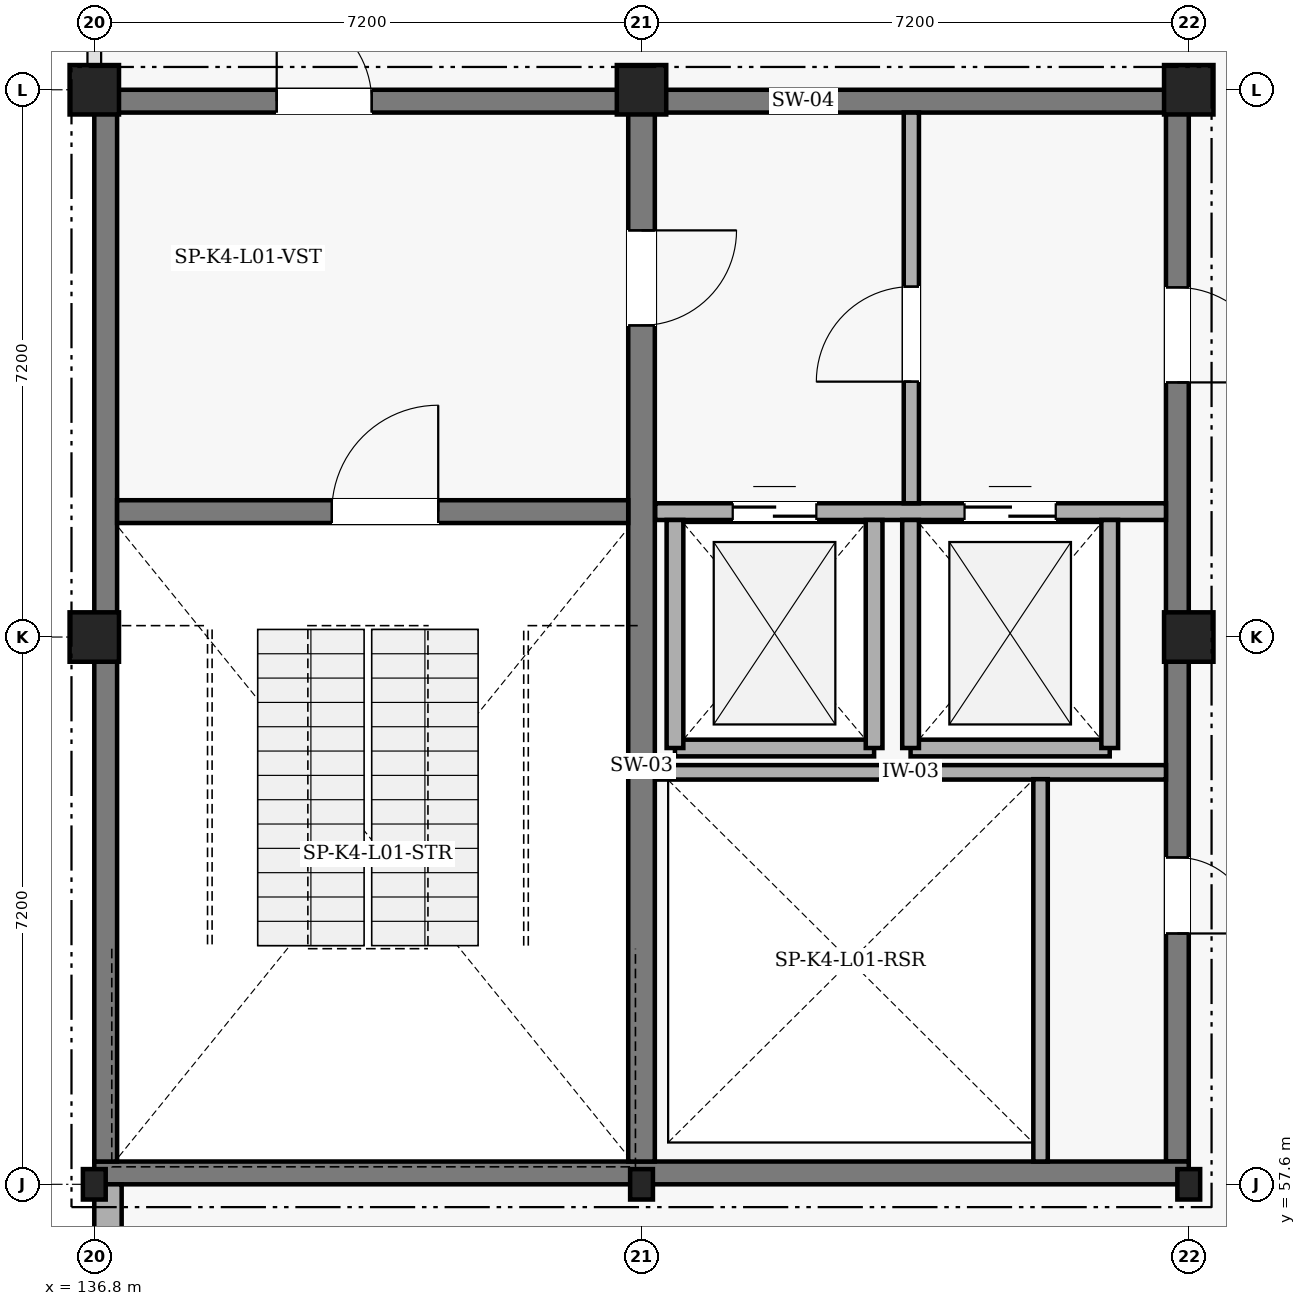
"""IFC4 building model, lengths in metres.
Left out: names, types, materials, properties, quantities, classifications, styles, units other than length and angle.
Written with IfcOpenShell. Run it as: python <this file> out.ifc"""

import sys

from ifc_helpers import new_model, si_unit, direction, frame, frame_2d, origin, origin_2d, place, context, subcontext, project, spatial, rectangle, i_section, extrude, element, fill, save


model = new_model("IFC4")
c1 = context("Model", 3, precision=1e-05, world=origin(), true_north=direction((0.0, 1.0)))
c2 = subcontext(c1, "Body", "Model", "MODEL_VIEW")
j1 = project(units=[si_unit("LENGTHUNIT", "METRE"), si_unit("PLANEANGLEUNIT", "RADIAN")], contexts=[c1])
p1 = place(None, origin())
s1 = spatial("IfcSite", under=j1, at=p1, CompositionType="ELEMENT")
p2 = place(p1, origin())
s2 = spatial("IfcBuilding", under=s1, at=p2, CompositionType="ELEMENT")
p3 = place(p2, frame((0.0, 0.0, 5.4)))
s3 = spatial("IfcBuildingStorey", under=s2, at=p3, CompositionType="ELEMENT", Elevation=5.4)
p4 = place(p3, frame((136.8, 71.85, 0.0), z_axis=(0.0, 0.0, 1.0), x_axis=(1.0, 0.0, 0.0)))
e1 = element("IfcWall", 1, at=p4, inside=s3, PredefinedType="SHEAR", context=c2, shape_type="SweptSolid", body=[
    extrude(rectangle(XDim=14.4, YDim=0.3, at=frame_2d((7.2, 0.0))), origin(), (0.0, 0.0, 1.0), 4.2),
])
p5 = place(p4, frame((2.4, 0.0, 0.0)))
e2 = element("IfcOpeningElement", 2, at=p5, cuts=e1, PredefinedType="OPENING", context=c2, shape_type="SweptSolid", body=[
    extrude(rectangle(XDim=1.25, YDim=2.2, at=frame_2d((0.625, 1.1))), frame((0.0, 0.16, 0.0), z_axis=(0.0, -1.0, 0.0), x_axis=(1.0, 0.0, 0.0)), (0.0, 0.0, 1.0), 0.32),
])
p6 = place(p3, frame((151.05, 71.7, 0.0), z_axis=(0.0, 0.0, 1.0), x_axis=(0.0, -1.0, 0.0)))
e3 = element("IfcWall", 3, at=p6, inside=s3, PredefinedType="SHEAR", context=c2, shape_type="SweptSolid", body=[
    extrude(rectangle(XDim=13.8, YDim=0.3, at=frame_2d((6.9, 0.0))), origin(), (0.0, 0.0, 1.0), 4.2),
])
p7 = place(p6, frame((9.8, 0.0, 0.0)))
e4 = element("IfcOpeningElement", 4, at=p7, cuts=e3, PredefinedType="OPENING", context=c2, shape_type="SweptSolid", body=[
    extrude(rectangle(XDim=1.0, YDim=2.15, at=frame_2d((0.5, 1.075))), frame((0.0, 0.16, 0.0), z_axis=(0.0, -1.0, 0.0), x_axis=(1.0, 0.0, 0.0)), (0.0, 0.0, 1.0), 0.32),
])
p8 = place(p6, frame((2.3, 0.0, 0.0)))
e5 = element("IfcOpeningElement", 5, at=p8, cuts=e3, PredefinedType="OPENING", context=c2, shape_type="SweptSolid", body=[
    extrude(rectangle(XDim=1.25, YDim=2.2, at=frame_2d((0.625, 1.1))), frame((0.0, 0.16, 0.0), z_axis=(0.0, -1.0, 0.0), x_axis=(1.0, 0.0, 0.0)), (0.0, 0.0, 1.0), 0.32),
])
p9 = place(p3, frame((151.2, 57.75, 0.0), z_axis=(0.0, 0.0, 1.0), x_axis=(-1.0, 0.0, 0.0)))
e6 = element("IfcWall", 6, at=p9, inside=s3, PredefinedType="SHEAR", context=c2, shape_type="SweptSolid", body=[
    extrude(rectangle(XDim=14.4, YDim=0.3, at=frame_2d((7.2, 0.0))), origin(), (0.0, 0.0, 1.0), 4.2),
])
p10 = place(p3, frame((136.95, 57.9, 0.0), z_axis=(0.0, 0.0, 1.0), x_axis=(0.0, 1.0, 0.0)))
e7 = element("IfcWall", 7, at=p10, inside=s3, PredefinedType="SHEAR", context=c2, shape_type="SweptSolid", body=[
    extrude(rectangle(XDim=13.8, YDim=0.3, at=frame_2d((6.9, 0.0))), origin(), (0.0, 0.0, 1.0), 4.2),
])
p11 = place(p3, frame((144.0, 71.7, 0.0), z_axis=(0.0, 0.0, 1.0), x_axis=(0.0, -1.0, 0.0)))
e8 = element("IfcWall", 8, at=p11, inside=s3, PredefinedType="SHEAR", context=c2, shape_type="SweptSolid", body=[
    extrude(rectangle(XDim=13.8, YDim=0.35, at=frame_2d((6.9, 0.0))), origin(), (0.0, 0.0, 1.0), 4.2),
])
p12 = place(p11, frame((1.55, 0.0, 0.0)))
e9 = element("IfcOpeningElement", 9, at=p12, cuts=e8, PredefinedType="OPENING", context=c2, shape_type="SweptSolid", body=[
    extrude(rectangle(XDim=1.25, YDim=2.2, at=frame_2d((0.625, 1.1))), frame((0.0, 0.185, 0.0), z_axis=(0.0, -1.0, 0.0), x_axis=(1.0, 0.0, 0.0)), (0.0, 0.0, 1.0), 0.37),
])
p13 = place(p3, frame((137.1, 66.45, 0.0), z_axis=(0.0, 0.0, 1.0), x_axis=(1.0, 0.0, 0.0)))
e10 = element("IfcWall", 10, at=p13, inside=s3, PredefinedType="SHEAR", context=c2, shape_type="SweptSolid", body=[
    extrude(rectangle(XDim=6.725, YDim=0.3, at=frame_2d((3.362, 0.0))), origin(), (0.0, 0.0, 1.0), 4.2),
])
p14 = place(p13, frame((2.825, 0.0, 0.0)))
e11 = element("IfcOpeningElement", 11, at=p14, cuts=e10, PredefinedType="OPENING", context=c2, shape_type="SweptSolid", body=[
    extrude(rectangle(XDim=1.4, YDim=2.2, at=frame_2d((0.7, 1.1))), frame((0.0, 0.16, 0.0), z_axis=(0.0, -1.0, 0.0), x_axis=(1.0, 0.0, 0.0)), (0.0, 0.0, 1.0), 0.32),
])
p15 = place(p3, frame((136.8, 57.6, 0.0), z_axis=(0.0, 0.0, 1.0), x_axis=(1.0, 0.0, 0.0)))
e12 = element("IfcColumn", 12, at=p15, inside=s3, PredefinedType="COLUMN", context=c2, shape_type="SweptSolid", body=[
    extrude(i_section(OverallWidth=0.3, OverallDepth=0.4, WebThickness=0.013, FlangeThickness=0.024, FilletRadius=0.027, at=origin_2d()), origin(), (0.0, 0.0, 1.0), 3.9),
])
for number, where, z_axis, x_axis in (
    (13, (136.8, 64.8, 0.0), (0.0, 0.0, 1.0), (1.0, 0.0, 0.0)),
    (14, (136.8, 72.0, 0.0), (0.0, 0.0, 1.0), (1.0, 0.0, 0.0)),
):
    element("IfcColumn", number, at=place(p3, frame(where, z_axis=z_axis, x_axis=x_axis)), inside=s3, PredefinedType="COLUMN", context=c2, shape_type="SweptSolid", body=[
        extrude(rectangle(XDim=0.65, YDim=0.65, at=origin_2d()), origin(), (0.0, 0.0, 1.0), 3.9),
    ])
p16 = place(p3, frame((144.0, 57.6, 0.0), z_axis=(0.0, 0.0, 1.0), x_axis=(1.0, 0.0, 0.0)))
e15 = element("IfcColumn", 15, at=p16, inside=s3, PredefinedType="COLUMN", context=c2, shape_type="SweptSolid", body=[
    extrude(i_section(OverallWidth=0.3, OverallDepth=0.4, WebThickness=0.013, FlangeThickness=0.024, FilletRadius=0.027, at=origin_2d()), origin(), (0.0, 0.0, 1.0), 3.9),
])
p17 = place(p3, frame((144.0, 72.0, 0.0), z_axis=(0.0, 0.0, 1.0), x_axis=(1.0, 0.0, 0.0)))
e16 = element("IfcColumn", 16, at=p17, inside=s3, PredefinedType="COLUMN", context=c2, shape_type="SweptSolid", body=[
    extrude(rectangle(XDim=0.65, YDim=0.65, at=origin_2d()), origin(), (0.0, 0.0, 1.0), 3.9),
])
p18 = place(p3, frame((151.2, 57.6, 0.0), z_axis=(0.0, 0.0, 1.0), x_axis=(1.0, 0.0, 0.0)))
e17 = element("IfcColumn", 17, at=p18, inside=s3, PredefinedType="COLUMN", context=c2, shape_type="SweptSolid", body=[
    extrude(i_section(OverallWidth=0.3, OverallDepth=0.4, WebThickness=0.013, FlangeThickness=0.024, FilletRadius=0.027, at=origin_2d()), origin(), (0.0, 0.0, 1.0), 3.9),
])
for number, where, z_axis, x_axis in (
    (18, (151.2, 64.8, 0.0), (0.0, 0.0, 1.0), (1.0, 0.0, 0.0)),
    (19, (151.2, 72.0, 0.0), (0.0, 0.0, 1.0), (1.0, 0.0, 0.0)),
):
    element("IfcColumn", number, at=place(p3, frame(where, z_axis=z_axis, x_axis=x_axis)), inside=s3, PredefinedType="COLUMN", context=c2, shape_type="SweptSolid", body=[
        extrude(rectangle(XDim=0.65, YDim=0.65, at=origin_2d()), origin(), (0.0, 0.0, 1.0), 3.9),
    ])
p19 = place(p3, frame((136.98, 50.37, 0.0), z_axis=(0.0, 0.0, 1.0), x_axis=(0.0, 1.0, 0.0)))
e20 = element("IfcWall", 20, at=p19, inside=s3, PredefinedType="SOLIDWALL", context=c2, shape_type="SweptSolid", body=[
    extrude(rectangle(XDim=7.23, YDim=0.36, at=frame_2d((3.615, 0.0))), origin(), (0.0, 0.0, 1.0), 3.25),
])
p20 = place(p19, frame((1.73, 0.0, 0.9)))
e21 = element("IfcOpeningElement", 21, at=p20, cuts=e20, PredefinedType="OPENING", context=c2, shape_type="SweptSolid", body=[
    extrude(rectangle(XDim=3.8, YDim=1.85, at=frame_2d((1.9, 0.925))), frame((0.0, 0.19, 0.0), z_axis=(0.0, -1.0, 0.0), x_axis=(1.0, 0.0, 0.0)), (0.0, 0.0, 1.0), 0.38),
])
p21 = place(p3, frame((144.18, 63.02, 0.0), z_axis=(0.0, 0.0, 1.0), x_axis=(1.0, 0.0, 0.0)))
e22 = element("IfcWall", 22, at=p21, inside=s3, PredefinedType="PARTITIONING", context=c2, shape_type="SweptSolid", body=[
    extrude(rectangle(XDim=6.72, YDim=0.19, at=frame_2d((3.36, 0.0))), origin(), (0.0, 0.0, 1.0), 3.85),
])
p22 = place(p3, frame((149.25, 57.9, 0.0), z_axis=(0.0, 0.0, 1.0), x_axis=(0.0, 1.0, 0.0)))
e23 = element("IfcWall", 23, at=p22, inside=s3, PredefinedType="PARTITIONING", context=c2, shape_type="SweptSolid", body=[
    extrude(rectangle(XDim=5.03, YDim=0.19, at=frame_2d((2.515, 0.0))), origin(), (0.0, 0.0, 1.0), 3.85),
])
p23 = place(p3, frame((144.18, 66.45, 0.0), z_axis=(0.0, 0.0, 1.0), x_axis=(1.0, 0.0, 0.0)))
e24 = element("IfcWall", 24, at=p23, inside=s3, PredefinedType="PARTITIONING", context=c2, shape_type="SweptSolid", body=[
    extrude(rectangle(XDim=6.72, YDim=0.22, at=frame_2d((3.36, 0.0))), origin(), (0.0, 0.0, 1.0), 3.85),
])
p24 = place(p23, frame((1.02, 0.0, 0.0)))
e25 = element("IfcOpeningElement", 25, at=p24, cuts=e24, PredefinedType="OPENING", context=c2, shape_type="SweptSolid", body=[
    extrude(rectangle(XDim=1.1, YDim=2.15, at=frame_2d((0.55, 1.075))), frame((0.0, 0.12, 0.0), z_axis=(0.0, -1.0, 0.0), x_axis=(1.0, 0.0, 0.0)), (0.0, 0.0, 1.0), 0.24),
])
p25 = place(p23, frame((4.07, 0.0, 0.0)))
e26 = element("IfcOpeningElement", 26, at=p25, cuts=e24, PredefinedType="OPENING", context=c2, shape_type="SweptSolid", body=[
    extrude(rectangle(XDim=1.2, YDim=2.15, at=frame_2d((0.6, 1.075))), frame((0.0, 0.12, 0.0), z_axis=(0.0, -1.0, 0.0), x_axis=(1.0, 0.0, 0.0)), (0.0, 0.0, 1.0), 0.24),
])
p26 = place(p3, frame((144.44, 63.34, 0.0), z_axis=(0.0, 0.0, 1.0), x_axis=(1.0, 0.0, 0.0)))
e27 = element("IfcWall", 27, at=p26, inside=s3, PredefinedType="PARTITIONING", context=c2, shape_type="SweptSolid", body=[
    extrude(rectangle(XDim=2.62, YDim=0.22, at=frame_2d((1.31, 0.0))), origin(), (0.0, 0.0, 1.0), 3.85),
])
for number, where, z_axis, x_axis in (
    (28, (144.44, 63.34, 0.0), (0.0, 0.0, 1.0), (0.0, 1.0, 0.0)),
    (29, (147.06, 63.34, 0.0), (0.0, 0.0, 1.0), (0.0, 1.0, 0.0)),
):
    element("IfcWall", number, at=place(p3, frame(where, z_axis=z_axis, x_axis=x_axis)), inside=s3, PredefinedType="PARTITIONING", context=c2, shape_type="SweptSolid", body=[
        extrude(rectangle(XDim=3.0, YDim=0.22, at=frame_2d((1.5, 0.0))), origin(), (0.0, 0.0, 1.0), 3.85),
    ])
p27 = place(p3, frame((147.54, 63.34, 0.0), z_axis=(0.0, 0.0, 1.0), x_axis=(1.0, 0.0, 0.0)))
e30 = element("IfcWall", 30, at=p27, inside=s3, PredefinedType="PARTITIONING", context=c2, shape_type="SweptSolid", body=[
    extrude(rectangle(XDim=2.62, YDim=0.22, at=frame_2d((1.31, 0.0))), origin(), (0.0, 0.0, 1.0), 3.85),
])
for number, where, z_axis, x_axis in (
    (31, (147.54, 63.34, 0.0), (0.0, 0.0, 1.0), (0.0, 1.0, 0.0)),
    (32, (150.16, 63.34, 0.0), (0.0, 0.0, 1.0), (0.0, 1.0, 0.0)),
):
    element("IfcWall", number, at=place(p3, frame(where, z_axis=z_axis, x_axis=x_axis)), inside=s3, PredefinedType="PARTITIONING", context=c2, shape_type="SweptSolid", body=[
        extrude(rectangle(XDim=3.0, YDim=0.22, at=frame_2d((1.5, 0.0))), origin(), (0.0, 0.0, 1.0), 3.85),
    ])
p28 = place(p3, frame((147.55, 66.56, 0.0), z_axis=(0.0, 0.0, 1.0), x_axis=(0.0, 1.0, 0.0)))
e33 = element("IfcWall", 33, at=p28, inside=s3, PredefinedType="PARTITIONING", context=c2, shape_type="SweptSolid", body=[
    extrude(rectangle(XDim=5.14, YDim=0.2, at=frame_2d((2.57, 0.0))), origin(), (0.0, 0.0, 1.0), 3.85),
])
p29 = place(p28, frame((1.6, 0.0, 0.0)))
e34 = element("IfcOpeningElement", 34, at=p29, cuts=e33, PredefinedType="OPENING", context=c2, shape_type="SweptSolid", body=[
    extrude(rectangle(XDim=1.25, YDim=2.2, at=frame_2d((0.625, 1.1))), frame((0.0, 0.11, 0.0), z_axis=(0.0, -1.0, 0.0), x_axis=(1.0, 0.0, 0.0)), (0.0, 0.0, 1.0), 0.22),
])
p30 = place(p14, origin())
e35 = element("IfcDoor", 35, at=p30, inside=s3, OperationType="SINGLE_SWING_RIGHT", PredefinedType="DOOR", context=c2, shape_type="SweptSolid", body=[
    extrude(rectangle(XDim=1.4, YDim=2.2, at=frame_2d((0.7, 1.1))), frame((0.0, 0.025, 0.0), z_axis=(0.0, -1.0, 0.0), x_axis=(1.0, 0.0, 0.0)), (0.0, 0.0, 1.0), 0.05),
])
fill(e11, e35)
p31 = place(p12, origin())
e36 = element("IfcDoor", 36, at=p31, inside=s3, OperationType="SINGLE_SWING_LEFT", PredefinedType="DOOR", context=c2, shape_type="SweptSolid", body=[
    extrude(rectangle(XDim=1.25, YDim=2.2, at=frame_2d((0.625, 1.1))), frame((0.0, 0.025, 0.0), z_axis=(0.0, -1.0, 0.0), x_axis=(1.0, 0.0, 0.0)), (0.0, 0.0, 1.0), 0.05),
])
fill(e9, e36)
p32 = place(p7, origin())
e37 = element("IfcDoor", 37, at=p32, inside=s3, OperationType="SINGLE_SWING_RIGHT", PredefinedType="DOOR", context=c2, shape_type="SweptSolid", body=[
    extrude(rectangle(XDim=1.0, YDim=2.15, at=frame_2d((0.5, 1.075))), frame((0.0, 0.025, 0.0), z_axis=(0.0, -1.0, 0.0), x_axis=(1.0, 0.0, 0.0)), (0.0, 0.0, 1.0), 0.05),
])
fill(e4, e37)
p33 = place(p24, origin())
e38 = element("IfcDoor", 38, at=p33, inside=s3, OperationType="DOUBLE_DOOR_SLIDING", PredefinedType="DOOR", context=c2, shape_type="SweptSolid", body=[
    extrude(rectangle(XDim=1.1, YDim=2.15, at=frame_2d((0.55, 1.075))), frame((0.0, 0.025, 0.0), z_axis=(0.0, -1.0, 0.0), x_axis=(1.0, 0.0, 0.0)), (0.0, 0.0, 1.0), 0.05),
])
fill(e25, e38)
p34 = place(p25, origin())
e39 = element("IfcDoor", 39, at=p34, inside=s3, OperationType="DOUBLE_DOOR_SLIDING", PredefinedType="DOOR", context=c2, shape_type="SweptSolid", body=[
    extrude(rectangle(XDim=1.2, YDim=2.15, at=frame_2d((0.6, 1.075))), frame((0.0, 0.025, 0.0), z_axis=(0.0, -1.0, 0.0), x_axis=(1.0, 0.0, 0.0)), (0.0, 0.0, 1.0), 0.05),
])
fill(e26, e39)
p35 = place(p29, origin())
e40 = element("IfcDoor", 40, at=p35, inside=s3, OperationType="SINGLE_SWING_LEFT", PredefinedType="DOOR", context=c2, shape_type="SweptSolid", body=[
    extrude(rectangle(XDim=1.25, YDim=2.2, at=frame_2d((0.625, 1.1))), frame((0.0, 0.025, 0.0), z_axis=(0.0, -1.0, 0.0), x_axis=(1.0, 0.0, 0.0)), (0.0, 0.0, 1.0), 0.05),
])
fill(e34, e40)
p36 = place(p8, origin())
e41 = element("IfcDoor", 41, at=p36, inside=s3, OperationType="SINGLE_SWING_RIGHT", PredefinedType="DOOR", context=c2, shape_type="SweptSolid", body=[
    extrude(rectangle(XDim=1.25, YDim=2.2, at=frame_2d((0.625, 1.1))), frame((0.0, 0.025, 0.0), z_axis=(0.0, -1.0, 0.0), x_axis=(1.0, 0.0, 0.0)), (0.0, 0.0, 1.0), 0.05),
])
fill(e5, e41)
p37 = place(p5, origin())
e42 = element("IfcDoor", 42, at=p37, inside=s3, OperationType="SINGLE_SWING_LEFT", PredefinedType="DOOR", context=c2, shape_type="SweptSolid", body=[
    extrude(rectangle(XDim=1.25, YDim=2.2, at=frame_2d((0.625, 1.1))), frame((0.0, 0.025, 0.0), z_axis=(0.0, -1.0, 0.0), x_axis=(1.0, 0.0, 0.0)), (0.0, 0.0, 1.0), 0.05),
])
fill(e2, e42)
save(model, sys.argv[1])
